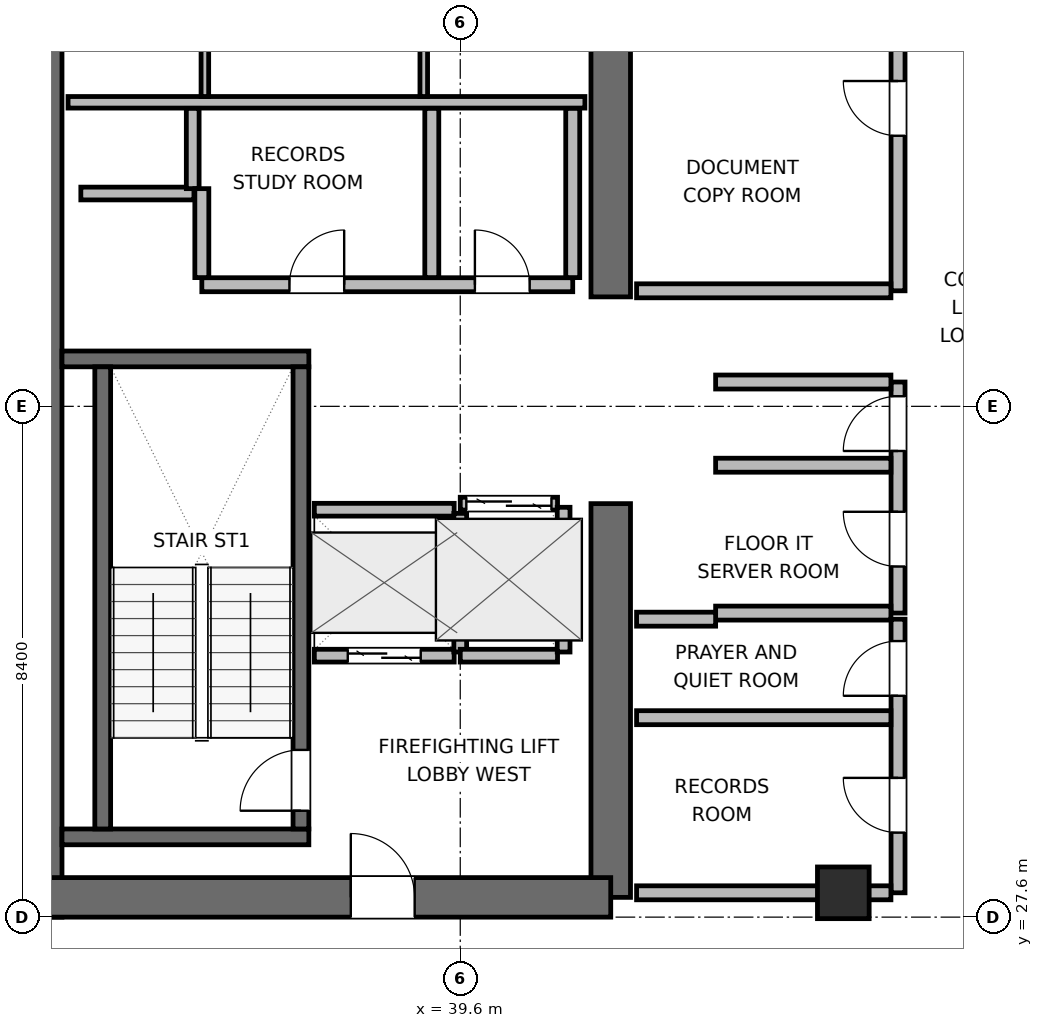
"""IFC4 building model, lengths in metres.
Left out: names, types, materials, properties, quantities, classifications, styles, units other than length and angle.
Written with IfcOpenShell. Run it as: python <this file> out.ifc"""

import sys

from ifc_helpers import new_model, si_unit, direction, frame, frame_2d, origin, origin_2d, place, context, subcontext, project, spatial, rectangle, extrude, element, fill, save


model = new_model("IFC4")
c1 = context("Model", 3, precision=1e-05, world=origin(), true_north=direction((0.0, 1.0)))
c2 = subcontext(c1, "Body", "Model", "MODEL_VIEW")
j1 = project(units=[si_unit("LENGTHUNIT", "METRE"), si_unit("PLANEANGLEUNIT", "RADIAN")], contexts=[c1])
p1 = place(None, origin())
s1 = spatial("IfcSite", under=j1, at=p1, CompositionType="ELEMENT")
p2 = place(p1, origin())
s2 = spatial("IfcBuilding", under=s1, at=p2, CompositionType="ELEMENT")
p3 = place(p2, frame((0.0, 0.0, 255.0)))
s3 = spatial("IfcBuildingStorey", under=s2, at=p3, CompositionType="ELEMENT", Elevation=255.0)
p4 = place(p3, frame((32.725, 27.6, 0.0), z_axis=(0.0, 0.0, 1.0), x_axis=(0.0, 1.0, 0.0)))
e1 = element("IfcWall", 1, at=p4, inside=s3, PredefinedType="SHEAR", context=c2, shape_type="SweptSolid", body=[
    extrude(rectangle(XDim=16.8, YDim=0.65, at=frame_2d((8.4, 0.0))), origin(), (0.0, 0.0, 1.0), 3.9),
])
p5 = place(p3, frame((42.075, 27.925, 0.0), z_axis=(0.0, 0.0, 1.0), x_axis=(0.0, 1.0, 0.0)))
e2 = element("IfcWall", 2, at=p5, inside=s3, PredefinedType="SHEAR", context=c2, shape_type="SweptSolid", body=[
    extrude(rectangle(XDim=6.475, YDim=0.65, at=frame_2d((3.237, 0.0))), origin(), (0.0, 0.0, 1.0), 3.9),
])
p6 = place(p3, frame((42.075, 37.8, 0.0), z_axis=(0.0, 0.0, 1.0), x_axis=(0.0, 1.0, 0.0)))
e3 = element("IfcWall", 3, at=p6, inside=s3, PredefinedType="SHEAR", context=c2, shape_type="SweptSolid", body=[
    extrude(rectangle(XDim=6.275, YDim=0.65, at=frame_2d((3.137, 0.0))), origin(), (0.0, 0.0, 1.0), 3.9),
])
p7 = place(p3, frame((32.725, 27.925, 0.0), z_axis=(0.0, 0.0, 1.0), x_axis=(1.0, 0.0, 0.0)))
e4 = element("IfcWall", 4, at=p7, inside=s3, PredefinedType="SHEAR", context=c2, shape_type="SweptSolid", body=[
    extrude(rectangle(XDim=9.35, YDim=0.65, at=frame_2d((4.675, 0.0))), origin(), (0.0, 0.0, 1.0), 3.9),
])
p8 = place(p7, frame((5.075, 0.0, 0.0)))
e5 = element("IfcOpeningElement", 5, at=p8, cuts=e4, PredefinedType="OPENING", context=c2, shape_type="SweptSolid", body=[
    extrude(rectangle(XDim=1.05, YDim=2.04, at=frame_2d((0.525, 1.02))), frame((0.0, 0.335, 0.0), z_axis=(0.0, -1.0, 0.0), x_axis=(1.0, 0.0, 0.0)), (0.0, 0.0, 1.0), 0.67),
])
for number, where, z_axis, x_axis in (
    (6, (33.05, 28.92, 0.0), (0.0, 0.0, 1.0), (1.0, 0.0, 0.0)),
    (7, (33.05, 36.78, 0.0), (0.0, 0.0, 1.0), (1.0, 0.0, 0.0)),
):
    element("IfcWall", number, at=place(p3, frame(where, z_axis=z_axis, x_axis=x_axis)), inside=s3, PredefinedType="SHEAR", context=c2, shape_type="SweptSolid", body=[
        extrude(rectangle(XDim=4.06, YDim=0.26, at=frame_2d((2.03, 0.0))), origin(), (0.0, 0.0, 1.0), 3.9),
    ])
p9 = place(p3, frame((33.72, 29.05, 0.0), z_axis=(0.0, 0.0, 1.0), x_axis=(0.0, 1.0, 0.0)))
e8 = element("IfcWall", 8, at=p9, inside=s3, PredefinedType="SHEAR", context=c2, shape_type="SweptSolid", body=[
    extrude(rectangle(XDim=7.6, YDim=0.26, at=frame_2d((3.8, 0.0))), origin(), (0.0, 0.0, 1.0), 3.9),
])
p10 = place(p3, frame((36.98, 29.05, 0.0), z_axis=(0.0, 0.0, 1.0), x_axis=(0.0, 1.0, 0.0)))
e9 = element("IfcWall", 9, at=p10, inside=s3, PredefinedType="SHEAR", context=c2, shape_type="SweptSolid", body=[
    extrude(rectangle(XDim=7.6, YDim=0.26, at=frame_2d((3.8, 0.0))), origin(), (0.0, 0.0, 1.0), 3.9),
])
p11 = place(p10, frame((0.3, 0.0, 0.0)))
e10 = element("IfcOpeningElement", 10, at=p11, cuts=e9, PredefinedType="OPENING", context=c2, shape_type="SweptSolid", body=[
    extrude(rectangle(XDim=1.0, YDim=2.04, at=frame_2d((0.5, 1.02))), frame((0.0, 0.14, 0.0), z_axis=(0.0, -1.0, 0.0), x_axis=(1.0, 0.0, 0.0)), (0.0, 0.0, 1.0), 0.28),
])
p12 = place(p3, frame((45.9, 28.0, 0.0), z_axis=(0.0, 0.0, 1.0), x_axis=(1.0, 0.0, 0.0)))
e11 = element("IfcColumn", 11, at=p12, inside=s3, PredefinedType="COLUMN", context=c2, shape_type="SweptSolid", body=[
    extrude(rectangle(XDim=0.85, YDim=0.85, at=origin_2d()), origin(), (0.0, 0.0, 1.0), 3.9),
])
p13 = place(p3, frame((33.15, 41.0, 0.0), z_axis=(0.0, 0.0, 1.0), x_axis=(1.0, 0.0, 0.0)))
e12 = element("IfcWall", 12, at=p13, inside=s3, PredefinedType="PLUMBINGWALL", context=c2, shape_type="SweptSolid", body=[
    extrude(rectangle(XDim=8.5, YDim=0.19, at=frame_2d((4.25, 0.0))), origin(), (0.0, 0.0, 1.0), 3.68),
])
for number, where, z_axis, x_axis in (
    (13, (35.4, 41.095, 0.0), (0.0, 0.0, 1.0), (0.0, 1.0, 0.0)),
    (14, (39.0, 41.095, 0.0), (0.0, 0.0, 1.0), (0.0, 1.0, 0.0)),
):
    element("IfcWall", number, at=place(p3, frame(where, z_axis=z_axis, x_axis=x_axis)), inside=s3, PredefinedType="PARTITIONING", context=c2, shape_type="SweptSolid", body=[
        extrude(rectangle(XDim=2.555, YDim=0.125, at=frame_2d((1.277, 0.0))), origin(), (0.0, 0.0, 1.0), 3.68),
    ])
p14 = place(p3, frame((33.36, 39.5, 0.0), z_axis=(0.0, 0.0, 1.0), x_axis=(1.0, 0.0, 0.0)))
e15 = element("IfcWall", 15, at=p14, inside=s3, PredefinedType="PARTITIONING", context=c2, shape_type="SweptSolid", body=[
    extrude(rectangle(XDim=1.86, YDim=0.21, at=frame_2d((0.93, 0.0))), origin(), (0.0, 0.0, 1.0), 3.68),
])
p15 = place(p3, frame((35.2, 39.58, 0.0), z_axis=(0.0, 0.0, 1.0), x_axis=(0.0, 1.0, 0.0)))
e16 = element("IfcWall", 16, at=p15, inside=s3, PredefinedType="PARTITIONING", context=c2, shape_type="SweptSolid", body=[
    extrude(rectangle(XDim=1.32, YDim=0.21, at=frame_2d((0.66, 0.0))), origin(), (0.0, 0.0, 1.0), 3.68),
])
p16 = place(p3, frame((37.2, 31.9, 0.0), z_axis=(0.0, 0.0, 1.0), x_axis=(1.0, 0.0, 0.0)))
e17 = element("IfcWall", 17, at=p16, inside=s3, PredefinedType="PARTITIONING", context=c2, shape_type="SweptSolid", body=[
    extrude(rectangle(XDim=2.3, YDim=0.21, at=frame_2d((1.15, 0.0))), origin(), (0.0, 0.0, 1.0), 3.68),
])
p17 = place(p16, frame((0.55, 0.0, 0.0)))
e18 = element("IfcOpeningElement", 18, at=p17, cuts=e17, PredefinedType="OPENING", context=c2, shape_type="SweptSolid", body=[
    extrude(rectangle(XDim=1.2, YDim=2.04, at=frame_2d((0.6, 1.02))), frame((0.0, 0.115, 0.0), z_axis=(0.0, -1.0, 0.0), x_axis=(1.0, 0.0, 0.0)), (0.0, 0.0, 1.0), 0.23),
])
p18 = place(p3, frame((37.2, 34.3, 0.0), z_axis=(0.0, 0.0, 1.0), x_axis=(1.0, 0.0, 0.0)))
e19 = element("IfcWall", 19, at=p18, inside=s3, PredefinedType="PARTITIONING", context=c2, shape_type="SweptSolid", body=[
    extrude(rectangle(XDim=2.3, YDim=0.21, at=frame_2d((1.15, 0.0))), origin(), (0.0, 0.0, 1.0), 3.68),
])
p19 = place(p3, frame((39.6, 31.96, 0.0), z_axis=(0.0, 0.0, 1.0), x_axis=(0.0, 1.0, 0.0)))
e20 = element("IfcWall", 20, at=p19, inside=s3, PredefinedType="PARTITIONING", context=c2, shape_type="SweptSolid", body=[
    extrude(rectangle(XDim=2.28, YDim=0.21, at=frame_2d((1.14, 0.0))), origin(), (0.0, 0.0, 1.0), 3.68),
])
p20 = place(p3, frame((39.6, 34.4, 0.0), z_axis=(0.0, 0.0, 1.0), x_axis=(1.0, 0.0, 0.0)))
e21 = element("IfcWall", 21, at=p20, inside=s3, PredefinedType="PARTITIONING", context=c2, shape_type="SweptSolid", body=[
    extrude(rectangle(XDim=1.6, YDim=0.21, at=frame_2d((0.8, 0.0))), origin(), (0.0, 0.0, 1.0), 3.68),
])
p21 = place(p20, frame((0.1, 0.0, 0.0)))
e22 = element("IfcOpeningElement", 22, at=p21, cuts=e21, PredefinedType="OPENING", context=c2, shape_type="SweptSolid", body=[
    extrude(rectangle(XDim=1.4, YDim=2.06, at=frame_2d((0.7, 1.03))), frame((0.0, 0.115, 0.0), z_axis=(0.0, -1.0, 0.0), x_axis=(1.0, 0.0, 0.0)), (0.0, 0.0, 1.0), 0.23),
])
p22 = place(p3, frame((39.6, 31.9, 0.0), z_axis=(0.0, 0.0, 1.0), x_axis=(1.0, 0.0, 0.0)))
e23 = element("IfcWall", 23, at=p22, inside=s3, PredefinedType="PARTITIONING", context=c2, shape_type="SweptSolid", body=[
    extrude(rectangle(XDim=1.6, YDim=0.21, at=frame_2d((0.8, 0.0))), origin(), (0.0, 0.0, 1.0), 3.68),
])
p23 = place(p3, frame((41.3, 31.96, 0.0), z_axis=(0.0, 0.0, 1.0), x_axis=(0.0, 1.0, 0.0)))
e24 = element("IfcWall", 24, at=p23, inside=s3, PredefinedType="PARTITIONING", context=c2, shape_type="SweptSolid", body=[
    extrude(rectangle(XDim=2.38, YDim=0.21, at=frame_2d((1.19, 0.0))), origin(), (0.0, 0.0, 1.0), 3.68),
])
p24 = place(p3, frame((35.35, 38.0, 0.0), z_axis=(0.0, 0.0, 1.0), x_axis=(1.0, 0.0, 0.0)))
e25 = element("IfcWall", 25, at=p24, inside=s3, PredefinedType="PARTITIONING", context=c2, shape_type="SweptSolid", body=[
    extrude(rectangle(XDim=6.1, YDim=0.23, at=frame_2d((3.05, 0.0))), origin(), (0.0, 0.0, 1.0), 3.68),
])
p25 = place(p24, frame((1.441, 0.0, 0.0)))
e26 = element("IfcOpeningElement", 26, at=p25, cuts=e25, PredefinedType="OPENING", context=c2, shape_type="SweptSolid", body=[
    extrude(rectangle(XDim=0.9, YDim=2.02, at=frame_2d((0.45, 1.01))), frame((0.0, 0.125, 0.0), z_axis=(0.0, -1.0, 0.0), x_axis=(1.0, 0.0, 0.0)), (0.0, 0.0, 1.0), 0.25),
])
p26 = place(p24, frame((4.491, 0.0, 0.0)))
e27 = element("IfcOpeningElement", 27, at=p26, cuts=e25, PredefinedType="OPENING", context=c2, shape_type="SweptSolid", body=[
    extrude(rectangle(XDim=0.9, YDim=2.02, at=frame_2d((0.45, 1.01))), frame((0.0, 0.125, 0.0), z_axis=(0.0, -1.0, 0.0), x_axis=(1.0, 0.0, 0.0)), (0.0, 0.0, 1.0), 0.25),
])
p27 = place(p3, frame((35.35, 38.117, 0.0), z_axis=(0.0, 0.0, 1.0), x_axis=(0.0, 1.0, 0.0)))
e28 = element("IfcWall", 28, at=p27, inside=s3, PredefinedType="PARTITIONING", context=c2, shape_type="SweptSolid", body=[
    extrude(rectangle(XDim=1.463, YDim=0.23, at=frame_2d((0.731, 0.0))), origin(), (0.0, 0.0, 1.0), 3.68),
])
for number, where, z_axis, x_axis in (
    (29, (41.45, 38.117, 0.0), (0.0, 0.0, 1.0), (0.0, 1.0, 0.0)),
    (30, (39.132, 38.117, 0.0), (0.0, 0.0, 1.0), (0.0, 1.0, 0.0)),
):
    element("IfcWall", number, at=place(p3, frame(where, z_axis=z_axis, x_axis=x_axis)), inside=s3, PredefinedType="PARTITIONING", context=c2, shape_type="SweptSolid", body=[
        extrude(rectangle(XDim=2.783, YDim=0.23, at=frame_2d((1.392, 0.0))), origin(), (0.0, 0.0, 1.0), 3.68),
    ])
p28 = place(p3, frame((46.8, 32.6, 0.0), z_axis=(0.0, 0.0, 1.0), x_axis=(0.0, 1.0, 0.0)))
e31 = element("IfcWall", 31, at=p28, inside=s3, PredefinedType="PARTITIONING", context=c2, shape_type="SweptSolid", body=[
    extrude(rectangle(XDim=3.8, YDim=0.23, at=frame_2d((1.9, 0.0))), origin(), (0.0, 0.0, 1.0), 3.68),
])
p29 = place(p28, frame((0.766, 0.0, 0.0)))
e32 = element("IfcOpeningElement", 32, at=p29, cuts=e31, PredefinedType="OPENING", context=c2, shape_type="SweptSolid", body=[
    extrude(rectangle(XDim=0.9, YDim=2.02, at=frame_2d((0.45, 1.01))), frame((0.0, 0.125, 0.0), z_axis=(0.0, -1.0, 0.0), x_axis=(1.0, 0.0, 0.0)), (0.0, 0.0, 1.0), 0.25),
])
p30 = place(p28, frame((2.666, 0.0, 0.0)))
e33 = element("IfcOpeningElement", 33, at=p30, cuts=e31, PredefinedType="OPENING", context=c2, shape_type="SweptSolid", body=[
    extrude(rectangle(XDim=0.9, YDim=2.02, at=frame_2d((0.45, 1.01))), frame((0.0, 0.125, 0.0), z_axis=(0.0, -1.0, 0.0), x_axis=(1.0, 0.0, 0.0)), (0.0, 0.0, 1.0), 0.25),
])
for number, where, z_axis, x_axis in (
    (34, (43.8, 32.6, 0.0), (0.0, 0.0, 1.0), (1.0, 0.0, 0.0)),
    (35, (43.8, 36.4, 0.0), (0.0, 0.0, 1.0), (1.0, 0.0, 0.0)),
    (36, (43.8, 35.032, 0.0), (0.0, 0.0, 1.0), (1.0, 0.0, 0.0)),
):
    element("IfcWall", number, at=place(p3, frame(where, z_axis=z_axis, x_axis=x_axis)), inside=s3, PredefinedType="PARTITIONING", context=c2, shape_type="SweptSolid", body=[
        extrude(rectangle(XDim=2.883, YDim=0.23, at=frame_2d((1.441, 0.0))), origin(), (0.0, 0.0, 1.0), 3.68),
    ])
p31 = place(p3, frame((46.8, 28.0, 0.0), z_axis=(0.0, 0.0, 1.0), x_axis=(0.0, 1.0, 0.0)))
e37 = element("IfcWall", 37, at=p31, inside=s3, PredefinedType="PARTITIONING", context=c2, shape_type="SweptSolid", body=[
    extrude(rectangle(XDim=4.5, YDim=0.23, at=frame_2d((2.25, 0.0))), origin(), (0.0, 0.0, 1.0), 3.68),
])
p32 = place(p31, frame((0.99, 0.0, 0.0)))
e38 = element("IfcOpeningElement", 38, at=p32, cuts=e37, PredefinedType="OPENING", context=c2, shape_type="SweptSolid", body=[
    extrude(rectangle(XDim=0.9, YDim=2.02, at=frame_2d((0.45, 1.01))), frame((0.0, 0.125, 0.0), z_axis=(0.0, -1.0, 0.0), x_axis=(1.0, 0.0, 0.0)), (0.0, 0.0, 1.0), 0.25),
])
p33 = place(p31, frame((3.24, 0.0, 0.0)))
e39 = element("IfcOpeningElement", 39, at=p33, cuts=e37, PredefinedType="OPENING", context=c2, shape_type="SweptSolid", body=[
    extrude(rectangle(XDim=0.9, YDim=2.02, at=frame_2d((0.45, 1.01))), frame((0.0, 0.125, 0.0), z_axis=(0.0, -1.0, 0.0), x_axis=(1.0, 0.0, 0.0)), (0.0, 0.0, 1.0), 0.25),
])
p34 = place(p3, frame((42.5, 28.0, 0.0), z_axis=(0.0, 0.0, 1.0), x_axis=(1.0, 0.0, 0.0)))
e40 = element("IfcWall", 40, at=p34, inside=s3, PredefinedType="PARTITIONING", context=c2, shape_type="SweptSolid", body=[
    extrude(rectangle(XDim=4.183, YDim=0.23, at=frame_2d((2.092, 0.0))), origin(), (0.0, 0.0, 1.0), 2.765),
])
p35 = place(p3, frame((42.5, 32.5, 0.0), z_axis=(0.0, 0.0, 1.0), x_axis=(1.0, 0.0, 0.0)))
e41 = element("IfcWall", 41, at=p35, inside=s3, PredefinedType="PARTITIONING", context=c2, shape_type="SweptSolid", body=[
    extrude(rectangle(XDim=1.3, YDim=0.23, at=frame_2d((0.65, 0.0))), origin(), (0.0, 0.0, 1.0), 3.68),
])
p36 = place(p3, frame((42.5, 30.88, 0.0), z_axis=(0.0, 0.0, 1.0), x_axis=(1.0, 0.0, 0.0)))
e42 = element("IfcWall", 42, at=p36, inside=s3, PredefinedType="PARTITIONING", context=c2, shape_type="SweptSolid", body=[
    extrude(rectangle(XDim=4.183, YDim=0.23, at=frame_2d((2.092, 0.0))), origin(), (0.0, 0.0, 1.0), 3.68),
])
p37 = place(p3, frame((46.8, 37.9, 0.0), z_axis=(0.0, 0.0, 1.0), x_axis=(0.0, 1.0, 0.0)))
e43 = element("IfcWall", 43, at=p37, inside=s3, PredefinedType="PARTITIONING", context=c2, shape_type="SweptSolid", body=[
    extrude(rectangle(XDim=6.0, YDim=0.23, at=frame_2d((3.0, 0.0))), origin(), (0.0, 0.0, 1.0), 3.68),
])
p38 = place(p37, frame((2.55, 0.0, 0.0)))
e44 = element("IfcOpeningElement", 44, at=p38, cuts=e43, PredefinedType="OPENING", context=c2, shape_type="SweptSolid", body=[
    extrude(rectangle(XDim=0.9, YDim=2.02, at=frame_2d((0.45, 1.01))), frame((0.0, 0.125, 0.0), z_axis=(0.0, -1.0, 0.0), x_axis=(1.0, 0.0, 0.0)), (0.0, 0.0, 1.0), 0.25),
])
p39 = place(p3, frame((42.5, 37.9, 0.0), z_axis=(0.0, 0.0, 1.0), x_axis=(1.0, 0.0, 0.0)))
e45 = element("IfcWall", 45, at=p39, inside=s3, PredefinedType="PARTITIONING", context=c2, shape_type="SweptSolid", body=[
    extrude(rectangle(XDim=4.183, YDim=0.23, at=frame_2d((2.092, 0.0))), origin(), (0.0, 0.0, 1.0), 3.68),
])
p40 = place(p11, origin())
e46 = element("IfcDoor", 46, at=p40, inside=s3, OperationType="SINGLE_SWING_LEFT", PredefinedType="DOOR", context=c2, shape_type="SweptSolid", body=[
    extrude(rectangle(XDim=1.0, YDim=2.04, at=frame_2d((0.5, 1.02))), frame((0.0, 0.025, 0.0), z_axis=(0.0, -1.0, 0.0), x_axis=(1.0, 0.0, 0.0)), (0.0, 0.0, 1.0), 0.05),
])
fill(e10, e46)
p41 = place(p17, origin())
e47 = element("IfcDoor", 47, at=p41, inside=s3, OperationType="DOUBLE_DOOR_SLIDING", PredefinedType="DOOR", context=c2, shape_type="SweptSolid", body=[
    extrude(rectangle(XDim=1.2, YDim=2.04, at=frame_2d((0.6, 1.02))), frame((0.0, 0.025, 0.0), z_axis=(0.0, -1.0, 0.0), x_axis=(1.0, 0.0, 0.0)), (0.0, 0.0, 1.0), 0.05),
])
fill(e18, e47)
p42 = place(p21, origin())
e48 = element("IfcDoor", 48, at=p42, inside=s3, OperationType="DOUBLE_DOOR_SLIDING", PredefinedType="DOOR", context=c2, shape_type="SweptSolid", body=[
    extrude(rectangle(XDim=1.4, YDim=2.06, at=frame_2d((0.7, 1.03))), frame((0.0, 0.025, 0.0), z_axis=(0.0, -1.0, 0.0), x_axis=(1.0, 0.0, 0.0)), (0.0, 0.0, 1.0), 0.05),
])
fill(e22, e48)
p43 = place(p8, origin())
e49 = element("IfcDoor", 49, at=p43, inside=s3, OperationType="SINGLE_SWING_LEFT", PredefinedType="DOOR", context=c2, shape_type="SweptSolid", body=[
    extrude(rectangle(XDim=1.05, YDim=2.04, at=frame_2d((0.525, 1.02))), frame((0.0, 0.025, 0.0), z_axis=(0.0, -1.0, 0.0), x_axis=(1.0, 0.0, 0.0)), (0.0, 0.0, 1.0), 0.05),
])
fill(e5, e49)
p44 = place(p25, origin())
e50 = element("IfcDoor", 50, at=p44, inside=s3, OperationType="SINGLE_SWING_RIGHT", PredefinedType="DOOR", context=c2, shape_type="SweptSolid", body=[
    extrude(rectangle(XDim=0.9, YDim=2.02, at=frame_2d((0.45, 1.01))), frame((0.0, 0.025, 0.0), z_axis=(0.0, -1.0, 0.0), x_axis=(1.0, 0.0, 0.0)), (0.0, 0.0, 1.0), 0.05),
])
fill(e26, e50)
p45 = place(p26, origin())
e51 = element("IfcDoor", 51, at=p45, inside=s3, OperationType="SINGLE_SWING_LEFT", PredefinedType="DOOR", context=c2, shape_type="SweptSolid", body=[
    extrude(rectangle(XDim=0.9, YDim=2.02, at=frame_2d((0.45, 1.01))), frame((0.0, 0.025, 0.0), z_axis=(0.0, -1.0, 0.0), x_axis=(1.0, 0.0, 0.0)), (0.0, 0.0, 1.0), 0.05),
])
fill(e27, e51)
p46 = place(p29, origin())
e52 = element("IfcDoor", 52, at=p46, inside=s3, OperationType="SINGLE_SWING_RIGHT", PredefinedType="DOOR", context=c2, shape_type="SweptSolid", body=[
    extrude(rectangle(XDim=0.9, YDim=2.02, at=frame_2d((0.45, 1.01))), frame((0.0, 0.025, 0.0), z_axis=(0.0, -1.0, 0.0), x_axis=(1.0, 0.0, 0.0)), (0.0, 0.0, 1.0), 0.05),
])
fill(e32, e52)
p47 = place(p30, origin())
e53 = element("IfcDoor", 53, at=p47, inside=s3, OperationType="SINGLE_SWING_LEFT", PredefinedType="DOOR", context=c2, shape_type="SweptSolid", body=[
    extrude(rectangle(XDim=0.9, YDim=2.02, at=frame_2d((0.45, 1.01))), frame((0.0, 0.025, 0.0), z_axis=(0.0, -1.0, 0.0), x_axis=(1.0, 0.0, 0.0)), (0.0, 0.0, 1.0), 0.05),
])
fill(e33, e53)
p48 = place(p32, origin())
e54 = element("IfcDoor", 54, at=p48, inside=s3, OperationType="SINGLE_SWING_RIGHT", PredefinedType="DOOR", context=c2, shape_type="SweptSolid", body=[
    extrude(rectangle(XDim=0.9, YDim=2.02, at=frame_2d((0.45, 1.01))), frame((0.0, 0.025, 0.0), z_axis=(0.0, -1.0, 0.0), x_axis=(1.0, 0.0, 0.0)), (0.0, 0.0, 1.0), 0.05),
])
fill(e38, e54)
p49 = place(p33, origin())
e55 = element("IfcDoor", 55, at=p49, inside=s3, OperationType="SINGLE_SWING_LEFT", PredefinedType="DOOR", context=c2, shape_type="SweptSolid", body=[
    extrude(rectangle(XDim=0.9, YDim=2.02, at=frame_2d((0.45, 1.01))), frame((0.0, 0.025, 0.0), z_axis=(0.0, -1.0, 0.0), x_axis=(1.0, 0.0, 0.0)), (0.0, 0.0, 1.0), 0.05),
])
fill(e39, e55)
p50 = place(p38, origin())
e56 = element("IfcDoor", 56, at=p50, inside=s3, OperationType="SINGLE_SWING_RIGHT", PredefinedType="DOOR", context=c2, shape_type="SweptSolid", body=[
    extrude(rectangle(XDim=0.9, YDim=2.02, at=frame_2d((0.45, 1.01))), frame((0.0, 0.025, 0.0), z_axis=(0.0, -1.0, 0.0), x_axis=(1.0, 0.0, 0.0)), (0.0, 0.0, 1.0), 0.05),
])
fill(e44, e56)
save(model, sys.argv[1])
